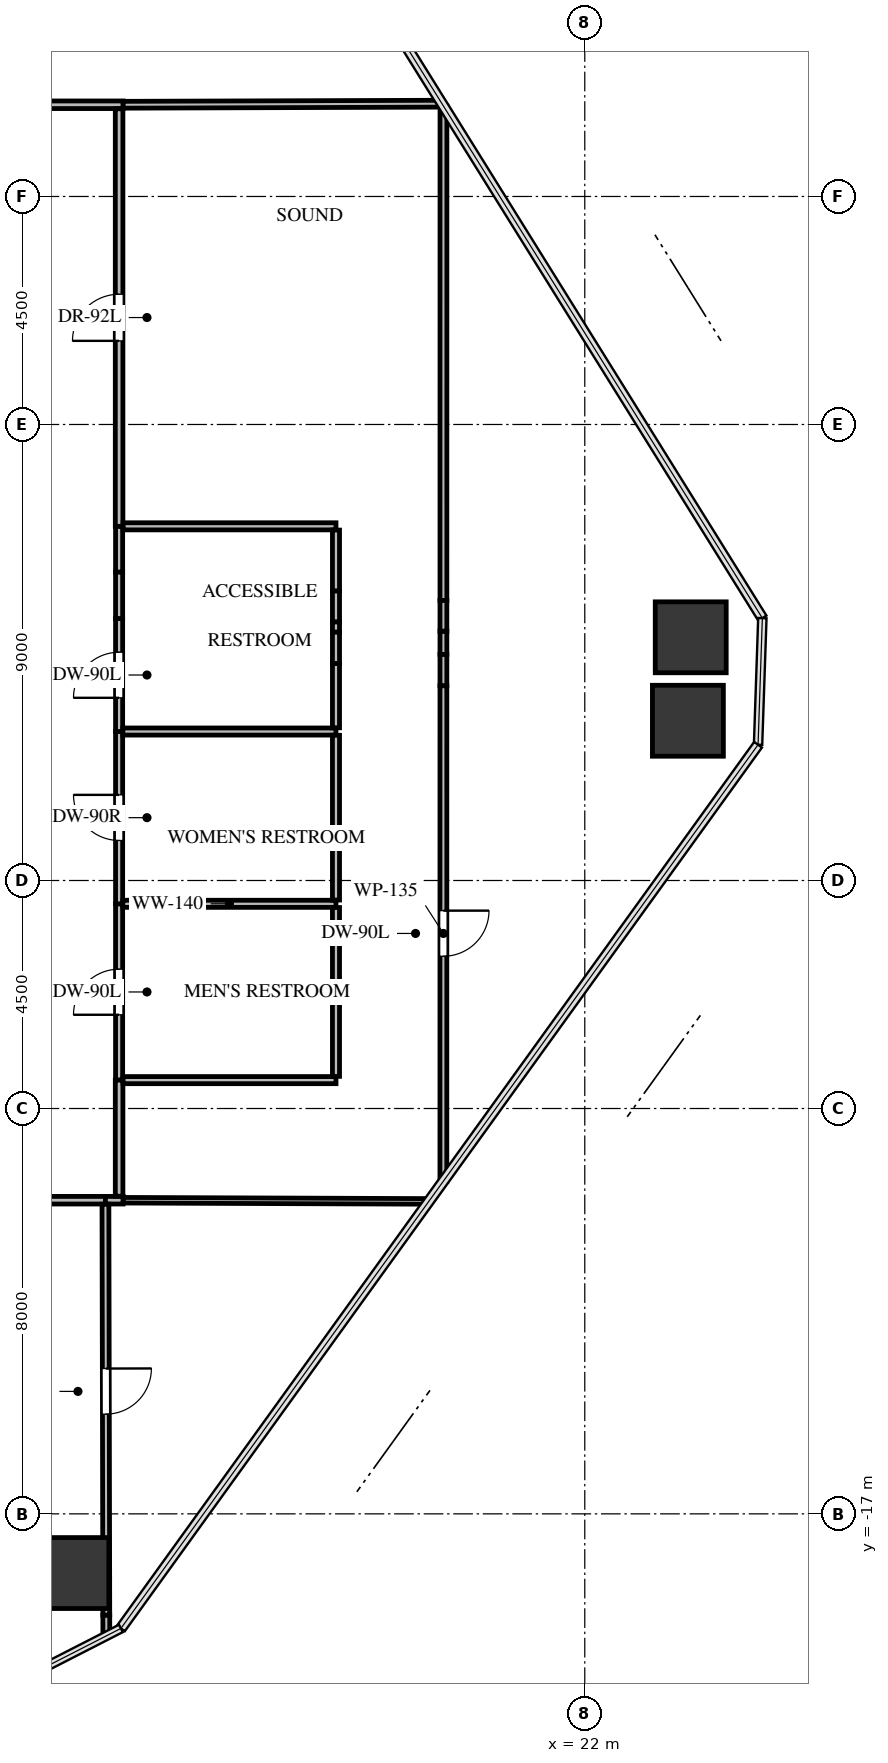
"""IFC4 building model, lengths in metres.
Left out: names, types, materials, properties, quantities, classifications, styles, units other than length and angle.
Written with IfcOpenShell. Run it as: python <this file> out.ifc"""

import sys

from ifc_helpers import new_model, si_unit, direction, frame, frame_2d, origin, origin_2d, place, context, subcontext, project, spatial, rectangle, extrude, source, transform, mapped, element, fill, save


model = new_model("IFC4")
c1 = context("Model", 3, precision=1e-05, world=origin(), true_north=direction((0.0, 1.0)))
c2 = subcontext(c1, "Body", "Model", "MODEL_VIEW")
j1 = project(units=[si_unit("LENGTHUNIT", "METRE"), si_unit("PLANEANGLEUNIT", "RADIAN")], contexts=[c1])
p1 = place(None, origin())
s1 = spatial("IfcSite", under=j1, at=p1, CompositionType="ELEMENT")
p2 = place(p1, origin())
s2 = spatial("IfcBuilding", under=s1, at=p2, CompositionType="ELEMENT")
p3 = place(p2, frame((0.0, 0.0, 55.5)))
s3 = spatial("IfcBuildingStorey", under=s2, at=p3, CompositionType="ELEMENT", Elevation=55.5)
m1 = source(origin(), c2, "Body", "SweptSolid", [
    extrude(rectangle(XDim=1.4, YDim=1.4, at=origin_2d()), origin(), (0.0, 0.0, 1.0), 3.3),
])
for number, where, z_axis, x_axis in (
    (1, (24.091, 0.3, -0.24), (0.0, 0.0, 1.0), (1.0, 0.0, 0.0)),
    (2, (24.035, -1.347, -0.24), (0.0, 0.0, 1.0), (1.0, 0.0, 0.0)),
    (3, (11.907, -18.168, -0.24), (0.0, 0.0, 1.0), (1.0, 0.0, 0.0)),
):
    element("IfcColumn", number, at=place(p3, frame(where, z_axis=z_axis, x_axis=x_axis)), inside=s3, PredefinedType="COLUMN", context=c2, shape_type="MappedRepresentation", body=[
        mapped(m1, transform((0.0, 0.0, 0.0), x_axis=(1.0, 0.0, 0.0), y_axis=(0.0, 1.0, 0.0), z_axis=(0.0, 0.0, 1.0), scale=1.0)),
    ])
p4 = place(p3, frame((12.81, -8.44, 0.0), z_axis=(0.0, 0.0, 1.0), x_axis=(0.0, 1.0, 0.0)))
e4 = element("IfcWall", 4, at=p4, inside=s3, PredefinedType="PARTITIONING", context=c2, shape_type="SweptSolid", body=[
    extrude(rectangle(XDim=3.48, YDim=0.14, at=frame_2d((1.74, 0.0))), origin(), (0.0, 0.0, 1.0), 3.045),
])
p5 = place(p4, frame((1.29, 0.0, 0.0)))
e5 = element("IfcOpeningElement", 5, at=p5, cuts=e4, PredefinedType="OPENING", context=c2, shape_type="SweptSolid", body=[
    extrude(rectangle(XDim=0.9, YDim=2.05, at=frame_2d((0.45, 1.025))), frame((0.0, 0.08, 0.0), z_axis=(0.0, -1.0, 0.0), x_axis=(1.0, 0.0, 0.0)), (0.0, 0.0, 1.0), 0.16),
])
p6 = place(p3, frame((12.81, -4.96, 0.0), z_axis=(0.0, 0.0, 1.0), x_axis=(0.0, 1.0, 0.0)))
e6 = element("IfcWall", 6, at=p6, inside=s3, PredefinedType="PARTITIONING", context=c2, shape_type="SweptSolid", body=[
    extrude(rectangle(XDim=3.4, YDim=0.14, at=frame_2d((1.7, 0.0))), origin(), (0.0, 0.0, 1.0), 3.045),
])
p7 = place(p6, frame((1.25, 0.0, 0.0)))
e7 = element("IfcOpeningElement", 7, at=p7, cuts=e6, PredefinedType="OPENING", context=c2, shape_type="SweptSolid", body=[
    extrude(rectangle(XDim=0.9, YDim=2.05, at=frame_2d((0.45, 1.025))), frame((0.0, 0.08, 0.0), z_axis=(0.0, -1.0, 0.0), x_axis=(1.0, 0.0, 0.0)), (0.0, 0.0, 1.0), 0.16),
])
p8 = place(p3, frame((12.81, -1.56, 0.0), z_axis=(0.0, 0.0, 1.0), x_axis=(0.0, 1.0, 0.0)))
e8 = element("IfcWall", 8, at=p8, inside=s3, PredefinedType="PARTITIONING", context=c2, shape_type="SweptSolid", body=[
    extrude(rectangle(XDim=2.231, YDim=0.14, at=frame_2d((1.116, 0.0))), origin(), (0.0, 0.0, 1.0), 3.045),
])
p9 = place(p8, frame((0.666, 0.0, 0.0)))
e9 = element("IfcOpeningElement", 9, at=p9, cuts=e8, PredefinedType="OPENING", context=c2, shape_type="SweptSolid", body=[
    extrude(rectangle(XDim=0.9, YDim=2.05, at=frame_2d((0.45, 1.025))), frame((0.0, 0.08, 0.0), z_axis=(0.0, -1.0, 0.0), x_axis=(1.0, 0.0, 0.0)), (0.0, 0.0, 1.0), 0.16),
])
p10 = place(p3, frame((12.81, 1.585, 0.0), z_axis=(0.0, 0.0, 1.0), x_axis=(0.0, 1.0, 0.0)))
e10 = element("IfcWall", 10, at=p10, inside=s3, PredefinedType="PARTITIONING", context=c2, shape_type="SweptSolid", body=[
    extrude(rectangle(XDim=0.905, YDim=0.14, at=frame_2d((0.453, 0.0))), origin(), (0.0, 0.0, 1.0), 3.045),
])
p11 = place(p3, frame((12.81, 0.671, 0.0), z_axis=(0.0, 0.0, 1.0), x_axis=(0.0, 1.0, 0.0)))
e11 = element("IfcWall", 11, at=p11, inside=s3, PredefinedType="PARTITIONING", context=c2, shape_type="SweptSolid", body=[
    extrude(rectangle(XDim=0.914, YDim=0.14, at=frame_2d((0.457, 0.0))), origin(), (0.0, 0.0, 1.0), 2.13),
])
p12 = place(p3, frame((12.89, 10.81, 0.0), z_axis=(0.0, 0.0, 1.0), x_axis=(-1.0, 0.0, 0.0)))
e12 = element("IfcWall", 12, at=p12, inside=s3, PredefinedType="PARTITIONING", context=c2, shape_type="SweptSolid", body=[
    extrude(rectangle(XDim=1.847, YDim=0.15, at=frame_2d((0.924, 0.0))), origin(), (0.0, 0.0, 1.0), 3.045),
])
p13 = place(p3, frame((5.817, -10.81, 0.0), z_axis=(0.0, 0.0, 1.0), x_axis=(1.0, 0.0, 0.0)))
e13 = element("IfcWall", 13, at=p13, inside=s3, PredefinedType="PARTITIONING", context=c2, shape_type="SweptSolid", body=[
    extrude(rectangle(XDim=6.723, YDim=0.15, at=frame_2d((3.361, 0.0))), origin(), (0.0, 0.0, 1.0), 2.13),
])
p14 = place(p13, frame((2.911, 0.0, 0.0)))
e14 = element("IfcOpeningElement", 14, at=p14, cuts=e13, PredefinedType="OPENING", context=c2, shape_type="SweptSolid", body=[
    extrude(rectangle(XDim=0.9, YDim=2.05, at=frame_2d((0.45, 1.025))), frame((0.0, 0.085, 0.0), z_axis=(0.0, -1.0, 0.0), x_axis=(1.0, 0.0, 0.0)), (0.0, 0.0, 1.0), 0.17),
])
p15 = place(p3, frame((12.54, -10.81, 0.0), z_axis=(0.0, 0.0, 1.0), x_axis=(1.0, 0.0, 0.0)))
e15 = element("IfcWall", 15, at=p15, inside=s3, PredefinedType="PARTITIONING", context=c2, shape_type="SweptSolid", body=[
    extrude(rectangle(XDim=0.35, YDim=0.15, at=frame_2d((0.175, 0.0))), origin(), (0.0, 0.0, 1.0), 3.045),
])
p16 = place(p3, frame((12.81, 2.49, 0.0), z_axis=(0.0, 0.0, 1.0), x_axis=(0.0, 1.0, 0.0)))
e16 = element("IfcWall", 16, at=p16, inside=s3, PredefinedType="PARTITIONING", context=c2, shape_type="SweptSolid", body=[
    extrude(rectangle(XDim=8.241, YDim=0.15, at=frame_2d((4.121, 0.0))), origin(), (0.0, 0.0, 1.0), 3.045),
])
p17 = place(p16, frame((3.66, 0.0, 0.0)))
e17 = element("IfcOpeningElement", 17, at=p17, cuts=e16, PredefinedType="OPENING", context=c2, shape_type="SweptSolid", body=[
    extrude(rectangle(XDim=0.92, YDim=2.1, at=frame_2d((0.46, 1.05))), frame((0.0, 0.085, 0.0), z_axis=(0.0, -1.0, 0.0), x_axis=(1.0, 0.0, 0.0)), (0.0, 0.0, 1.0), 0.17),
])
p18 = place(p3, frame((12.81, -10.731, 0.0), z_axis=(0.0, 0.0, 1.0), x_axis=(0.0, 1.0, 0.0)))
e18 = element("IfcWall", 18, at=p18, inside=s3, PredefinedType="PARTITIONING", context=c2, shape_type="SweptSolid", body=[
    extrude(rectangle(XDim=2.291, YDim=0.15, at=frame_2d((1.146, 0.0))), origin(), (0.0, 0.0, 1.0), 3.045),
])
p19 = place(p3, frame((12.884, -4.96, 0.0), z_axis=(0.0, 0.0, 1.0), x_axis=(1.0, 0.0, 0.0)))
e19 = element("IfcWall", 19, at=p19, inside=s3, PredefinedType="PARTITIONING", context=c2, shape_type="SweptSolid", body=[
    extrude(rectangle(XDim=4.206, YDim=0.14, at=frame_2d((2.103, 0.0))), origin(), (0.0, 0.0, 1.0), 3.045),
])
p20 = place(p3, frame((17.09, -8.44, 0.0), z_axis=(0.0, 0.0, 1.0), x_axis=(-1.0, 0.0, 0.0)))
e20 = element("IfcWall", 20, at=p20, inside=s3, PredefinedType="PARTITIONING", context=c2, shape_type="SweptSolid", body=[
    extrude(rectangle(XDim=4.201, YDim=0.14, at=frame_2d((2.101, 0.0))), origin(), (0.0, 0.0, 1.0), 3.045),
])
p21 = place(p3, frame((17.09, -5.034, 0.0), z_axis=(0.0, 0.0, 1.0), x_axis=(0.0, -1.0, 0.0)))
e21 = element("IfcWall", 21, at=p21, inside=s3, PredefinedType="PARTITIONING", context=c2, shape_type="SweptSolid", body=[
    extrude(rectangle(XDim=3.332, YDim=0.14, at=frame_2d((1.666, 0.0))), origin(), (0.0, 0.0, 1.0), 3.045),
])
p22 = place(p3, frame((12.884, -1.56, 0.0), z_axis=(0.0, 0.0, 1.0), x_axis=(1.0, 0.0, 0.0)))
e22 = element("IfcWall", 22, at=p22, inside=s3, PredefinedType="PARTITIONING", context=c2, shape_type="SweptSolid", body=[
    extrude(rectangle(XDim=4.206, YDim=0.14, at=frame_2d((2.103, 0.0))), origin(), (0.0, 0.0, 1.0), 3.045),
])
p23 = place(p3, frame((17.09, -1.634, 0.0), z_axis=(0.0, 0.0, 1.0), x_axis=(0.0, -1.0, 0.0)))
e23 = element("IfcWall", 23, at=p23, inside=s3, PredefinedType="PARTITIONING", context=c2, shape_type="SweptSolid", body=[
    extrude(rectangle(XDim=3.252, YDim=0.14, at=frame_2d((1.626, 0.0))), origin(), (0.0, 0.0, 1.0), 3.045),
])
p24 = place(p3, frame((12.889, 2.49, 0.0), z_axis=(0.0, 0.0, 1.0), x_axis=(1.0, 0.0, 0.0)))
e24 = element("IfcWall", 24, at=p24, inside=s3, PredefinedType="PARTITIONING", context=c2, shape_type="SweptSolid", body=[
    extrude(rectangle(XDim=4.201, YDim=0.14, at=frame_2d((2.101, 0.0))), origin(), (0.0, 0.0, 1.0), 3.045),
])
p25 = place(p3, frame((17.09, 2.416, 0.0), z_axis=(0.0, 0.0, 1.0), x_axis=(0.0, -1.0, 0.0)))
e25 = element("IfcWall", 25, at=p25, inside=s3, PredefinedType="PARTITIONING", context=c2, shape_type="SweptSolid", body=[
    extrude(rectangle(XDim=1.204, YDim=0.14, at=frame_2d((0.602, 0.0))), origin(), (0.0, 0.0, 1.0), 3.045),
])
p26 = place(p3, frame((17.09, 0.606, 0.0), z_axis=(0.0, 0.0, 1.0), x_axis=(0.0, -1.0, 0.0)))
e26 = element("IfcWall", 26, at=p26, inside=s3, PredefinedType="PARTITIONING", context=c2, shape_type="SweptSolid", body=[
    extrude(rectangle(XDim=0.205, YDim=0.14, at=frame_2d((0.103, 0.0))), origin(), (0.0, 0.0, 1.0), 3.045),
])
p27 = place(p3, frame((17.09, -0.216, 0.0), z_axis=(0.0, 0.0, 1.0), x_axis=(0.0, -1.0, 0.0)))
e27 = element("IfcWall", 27, at=p27, inside=s3, PredefinedType="PARTITIONING", context=c2, shape_type="SweptSolid", body=[
    extrude(rectangle(XDim=1.27, YDim=0.14, at=frame_2d((0.635, 0.0))), origin(), (0.0, 0.0, 1.0), 3.045),
])
p28 = place(p3, frame((17.09, 1.212, 0.0), z_axis=(0.0, 0.0, 1.0), x_axis=(0.0, -1.0, 0.0)))
e28 = element("IfcWall", 28, at=p28, inside=s3, PredefinedType="PARTITIONING", context=c2, shape_type="SweptSolid", body=[
    extrude(rectangle(XDim=0.606, YDim=0.14, at=frame_2d((0.303, 0.0))), origin(), (0.0, 0.0, 1.0), 2.13),
])
p29 = place(p3, frame((17.09, 0.401, 0.0), z_axis=(0.0, 0.0, 1.0), x_axis=(0.0, -1.0, 0.0)))
e29 = element("IfcWall", 29, at=p29, inside=s3, PredefinedType="PARTITIONING", context=c2, shape_type="SweptSolid", body=[
    extrude(rectangle(XDim=0.617, YDim=0.14, at=frame_2d((0.309, 0.0))), origin(), (0.0, 0.0, 1.0), 2.13),
])
p30 = place(p3, frame((19.182, 10.831, 0.0), z_axis=(0.0, 0.0, 1.0), x_axis=(-0.999994432845, -0.003336806783, 0.0)))
e30 = element("IfcWall", 30, at=p30, inside=s3, PredefinedType="PARTITIONING", context=c2, shape_type="SweptSolid", body=[
    extrude(rectangle(XDim=6.292, YDim=0.135, at=frame_2d((3.146, 0.0))), origin(), (0.0, 0.0, 1.0), 2.38),
])
p31 = place(p3, frame((12.54, -10.889, 0.0), z_axis=(0.0, 0.0, 1.0), x_axis=(0.002115348101, -0.999997762649, 0.0)))
e31 = element("IfcWall", 31, at=p31, inside=s3, PredefinedType="PARTITIONING", context=c2, shape_type="SweptSolid", body=[
    extrude(rectangle(XDim=7.386, YDim=0.135, at=frame_2d((3.693, 0.0))), origin(), (0.0, 0.0, 1.0), 2.38),
])
p32 = place(p31, frame((3.243, 0.0, 0.0)))
e32 = element("IfcOpeningElement", 32, at=p32, cuts=e31, PredefinedType="OPENING", context=c2, shape_type="SweptSolid", body=[
    extrude(rectangle(XDim=0.9, YDim=2.05, at=frame_2d((0.45, 1.025))), frame((0.0, 0.078, 0.0), z_axis=(0.0, -1.0, 0.0), x_axis=(1.0, 0.0, 0.0)), (0.0, 0.0, 1.0), 0.155),
])
p33 = place(p3, frame((12.557, -18.998, 0.0), z_axis=(0.0, 0.0, 1.0), x_axis=(0.001783588126, -0.999998409405, 0.0)))
e33 = element("IfcWall", 33, at=p33, inside=s3, PredefinedType="PARTITIONING", context=c2, shape_type="SweptSolid", body=[
    extrude(rectangle(XDim=0.411, YDim=0.135, at=frame_2d((0.205, 0.0))), origin(), (0.0, 0.0, 1.0), 3.045),
])
p34 = place(p3, frame((12.556, -18.275, 0.0), z_axis=(0.0, 0.0, 1.0), x_axis=(0.002028393393, -0.999997942808, 0.0)))
e34 = element("IfcWall", 34, at=p34, inside=s3, PredefinedType="PARTITIONING", context=c2, shape_type="SweptSolid", body=[
    extrude(rectangle(XDim=0.722, YDim=0.135, at=frame_2d((0.361, 0.0))), origin(), (0.0, 0.0, 1.0), 1.877),
])
p35 = place(p3, frame((12.89, -10.81, 0.0), z_axis=(0.0, 0.0, 1.0), x_axis=(0.999992607823, -0.003845035728, 0.0)))
e35 = element("IfcWall", 35, at=p35, inside=s3, PredefinedType="MOVABLE", context=c2, shape_type="SweptSolid", body=[
    extrude(rectangle(XDim=6.032, YDim=0.11, at=frame_2d((3.016, 0.0))), origin(), (0.0, 0.0, 1.0), 2.38),
])
p36 = place(p3, frame((19.211, 10.785, 0.0), z_axis=(0.0, 0.0, 1.0), x_axis=(-7.5063804e-05, -0.999999997183, 0.0)))
e36 = element("IfcWall", 36, at=p36, inside=s3, PredefinedType="PARTITIONING", context=c2, shape_type="SweptSolid", body=[
    extrude(rectangle(XDim=9.757, YDim=0.135, at=frame_2d((4.879, 0.0))), origin(), (0.0, 0.0, 1.0), 2.38),
])
p37 = place(p3, frame((19.21, 0.421, 0.0), z_axis=(0.0, 0.0, 1.0), x_axis=(0.0, -1.0, 0.0)))
e37 = element("IfcWall", 37, at=p37, inside=s3, PredefinedType="PARTITIONING", context=c2, shape_type="SweptSolid", body=[
    extrude(rectangle(XDim=0.46, YDim=0.135, at=frame_2d((0.23, 0.0))), origin(), (0.0, 0.0, 1.0), 3.045),
])
p38 = place(p3, frame((19.21, -0.656, 0.0), z_axis=(0.0, 0.0, 1.0), x_axis=(-7.4898886e-05, -0.999999997195, 0.0)))
e38 = element("IfcWall", 38, at=p38, inside=s3, PredefinedType="PARTITIONING", context=c2, shape_type="SweptSolid", body=[
    extrude(rectangle(XDim=9.779, YDim=0.135, at=frame_2d((4.889, 0.0))), origin(), (0.0, 0.0, 1.0), 2.38),
])
p39 = place(p38, frame((4.439, 0.0, 0.0)))
e39 = element("IfcOpeningElement", 39, at=p39, cuts=e38, PredefinedType="OPENING", context=c2, shape_type="SweptSolid", body=[
    extrude(rectangle(XDim=0.9, YDim=2.05, at=frame_2d((0.45, 1.025))), frame((0.0, 0.078, 0.0), z_axis=(0.0, -1.0, 0.0), x_axis=(1.0, 0.0, 0.0)), (0.0, 0.0, 1.0), 0.155),
])
p40 = place(p3, frame((19.21, 1.028, 0.0), z_axis=(0.0, 0.0, 1.0), x_axis=(0.0, -1.0, 0.0)))
e40 = element("IfcWall", 40, at=p40, inside=s3, PredefinedType="PARTITIONING", context=c2, shape_type="SweptSolid", body=[
    extrude(rectangle(XDim=0.606, YDim=0.135, at=frame_2d((0.303, 0.0))), origin(), (0.0, 0.0, 1.0), 2.13),
])
p41 = place(p3, frame((19.21, -0.039, 0.0), z_axis=(0.0, 0.0, 1.0), x_axis=(0.0, -1.0, 0.0)))
e41 = element("IfcWall", 41, at=p41, inside=s3, PredefinedType="PARTITIONING", context=c2, shape_type="SweptSolid", body=[
    extrude(rectangle(XDim=0.617, YDim=0.135, at=frame_2d((0.308, 0.0))), origin(), (0.0, 0.0, 1.0), 2.13),
])
m2 = source(origin(), c2, "Body", "SweptSolid", [
    extrude(rectangle(XDim=0.9, YDim=2.05, at=frame_2d((0.45, 1.025))), frame((0.0, 0.025, 0.0), z_axis=(0.0, -1.0, 0.0), x_axis=(1.0, 0.0, 0.0)), (0.0, 0.0, 1.0), 0.05),
])
p42 = place(p5, origin())
e42 = element("IfcDoor", 42, at=p42, inside=s3, OperationType="SINGLE_SWING_LEFT", PredefinedType="DOOR", context=c2, shape_type="MappedRepresentation", body=[
    mapped(m2, transform((0.0, 0.0, 0.0), x_axis=(1.0, 0.0, 0.0), y_axis=(0.0, 1.0, 0.0), z_axis=(0.0, 0.0, 1.0), scale=1.0)),
])
fill(e5, e42)
m3 = source(origin(), c2, "Body", "SweptSolid", [
    extrude(rectangle(XDim=0.9, YDim=2.05, at=frame_2d((0.45, 1.025))), frame((0.0, 0.025, 0.0), z_axis=(0.0, -1.0, 0.0), x_axis=(1.0, 0.0, 0.0)), (0.0, 0.0, 1.0), 0.05),
])
p43 = place(p7, origin())
e43 = element("IfcDoor", 43, at=p43, inside=s3, OperationType="SINGLE_SWING_RIGHT", PredefinedType="DOOR", context=c2, shape_type="MappedRepresentation", body=[
    mapped(m3, transform((0.0, 0.0, 0.0), x_axis=(1.0, 0.0, 0.0), y_axis=(0.0, 1.0, 0.0), z_axis=(0.0, 0.0, 1.0), scale=1.0)),
])
fill(e7, e43)
p44 = place(p9, origin())
e44 = element("IfcDoor", 44, at=p44, inside=s3, OperationType="SINGLE_SWING_LEFT", PredefinedType="DOOR", context=c2, shape_type="MappedRepresentation", body=[
    mapped(m2, transform((0.0, 0.0, 0.0), x_axis=(1.0, 0.0, 0.0), y_axis=(0.0, 1.0, 0.0), z_axis=(0.0, 0.0, 1.0), scale=1.0)),
])
fill(e9, e44)
m4 = source(origin(), c2, "Body", "SweptSolid", [
    extrude(rectangle(XDim=0.92, YDim=2.1, at=frame_2d((0.46, 1.05))), frame((0.0, 0.025, 0.0), z_axis=(0.0, -1.0, 0.0), x_axis=(1.0, 0.0, 0.0)), (0.0, 0.0, 1.0), 0.05),
])
p45 = place(p17, origin())
e45 = element("IfcDoor", 45, at=p45, inside=s3, OperationType="SINGLE_SWING_LEFT", PredefinedType="DOOR", context=c2, shape_type="MappedRepresentation", body=[
    mapped(m4, transform((0.0, 0.0, 0.0), x_axis=(1.0, 0.0, 0.0), y_axis=(0.0, 1.0, 0.0), z_axis=(0.0, 0.0, 1.0), scale=1.0)),
])
fill(e17, e45)
p46 = place(p32, origin())
e46 = element("IfcDoor", 46, at=p46, inside=s3, OperationType="SINGLE_SWING_LEFT", PredefinedType="DOOR", context=c2, shape_type="MappedRepresentation", body=[
    mapped(m2, transform((0.0, 0.0, 0.0), x_axis=(1.0, 0.0, 0.0), y_axis=(0.0, 1.0, 0.0), z_axis=(0.0, 0.0, 1.0), scale=1.0)),
])
fill(e32, e46)
p47 = place(p39, origin())
e47 = element("IfcDoor", 47, at=p47, inside=s3, OperationType="SINGLE_SWING_LEFT", PredefinedType="DOOR", context=c2, shape_type="MappedRepresentation", body=[
    mapped(m2, transform((0.0, 0.0, 0.0), x_axis=(1.0, 0.0, 0.0), y_axis=(0.0, 1.0, 0.0), z_axis=(0.0, 0.0, 1.0), scale=1.0)),
])
fill(e39, e47)
save(model, sys.argv[1])
